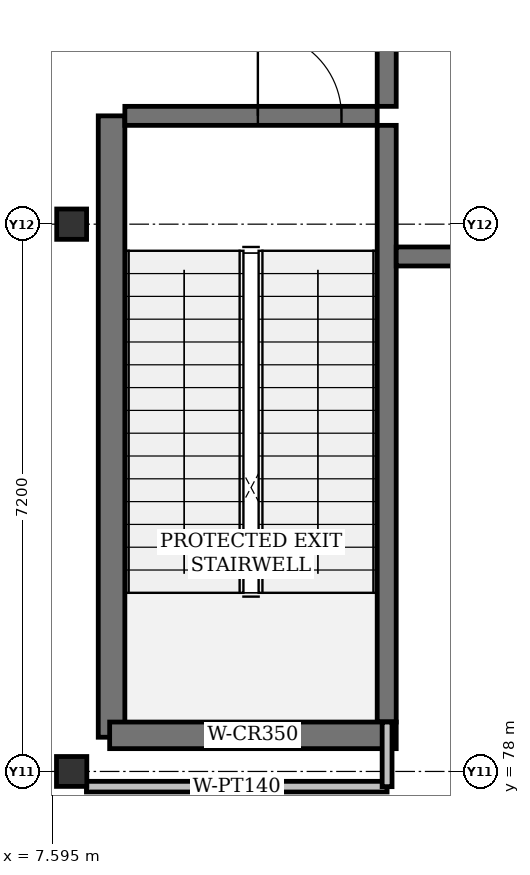
"""IFC4 building model, lengths in metres.
Left out: names, types, materials, properties, quantities, classifications, styles, units other than length and angle.
Written with IfcOpenShell. Run it as: python <this file> out.ifc"""

import sys

from ifc_helpers import new_model, si_unit, direction, frame, frame_2d, origin, origin_2d, place, context, subcontext, project, spatial, rectangle, i_section, extrude, element, fill, save


model = new_model("IFC4")
c1 = context("Model", 3, precision=1e-05, world=origin(), true_north=direction((0.0, 1.0)))
c2 = subcontext(c1, "Body", "Model", "MODEL_VIEW")
j1 = project(units=[si_unit("LENGTHUNIT", "METRE"), si_unit("PLANEANGLEUNIT", "RADIAN")], contexts=[c1])
p1 = place(None, origin())
s1 = spatial("IfcSite", under=j1, at=p1, CompositionType="ELEMENT")
p2 = place(p1, origin())
s2 = spatial("IfcBuilding", under=s1, at=p2, CompositionType="ELEMENT")
p3 = place(p2, origin())
s3 = spatial("IfcBuildingStorey", under=s2, at=p3, CompositionType="ELEMENT", Elevation=0.0)
for number, where, z_axis, x_axis in (
    (1, (7.85, 78.0, 0.0), (0.0, 0.0, 1.0), (1.0, 0.0, 0.0)),
    (2, (7.85, 85.2, 0.0), (0.0, 0.0, 1.0), (0.0, 1.0, 0.0)),
):
    element("IfcColumn", number, at=place(p3, frame(where, z_axis=z_axis, x_axis=x_axis)), inside=s3, PredefinedType="COLUMN", context=c2, shape_type="SweptSolid", body=[
        extrude(i_section(OverallWidth=0.399, OverallDepth=0.393, WebThickness=0.023, FlangeThickness=0.036, FilletRadius=0.015, at=origin_2d()), origin(), (0.0, 0.0, 1.0), 5.4),
    ])
p4 = place(p3, frame((8.375, 78.45, 0.0), z_axis=(0.0, 0.0, 1.0), x_axis=(0.0, 1.0, 0.0)))
e3 = element("IfcWall", 3, at=p4, inside=s3, PredefinedType="SHEAR", context=c2, shape_type="SweptSolid", body=[
    extrude(rectangle(XDim=8.175, YDim=0.35, at=frame_2d((4.087, 0.0))), origin(), (0.0, 0.0, 1.0), 5.4),
])
p5 = place(p3, frame((11.995, 78.65, 0.0), z_axis=(0.0, 0.0, 1.0), x_axis=(0.0, 1.0, 0.0)))
e4 = element("IfcWall", 4, at=p5, inside=s3, PredefinedType="SHEAR", context=c2, shape_type="SweptSolid", body=[
    extrude(rectangle(XDim=7.85, YDim=0.25, at=frame_2d((3.925, 0.0))), origin(), (0.0, 0.0, 1.0), 5.4),
])
p6 = place(p3, frame((11.995, 86.75, 0.0), z_axis=(0.0, 0.0, 1.0), x_axis=(0.0, 1.0, 0.0)))
e5 = element("IfcWall", 5, at=p6, inside=s3, PredefinedType="SHEAR", context=c2, shape_type="SweptSolid", body=[
    extrude(rectangle(XDim=3.9, YDim=0.25, at=frame_2d((1.95, 0.0))), origin(), (0.0, 0.0, 1.0), 5.4),
])
p7 = place(p6, frame((1.3, 0.0, 0.0)))
e6 = element("IfcOpeningElement", 6, at=p7, cuts=e5, PredefinedType="OPENING", context=c2, shape_type="SweptSolid", body=[
    extrude(rectangle(XDim=1.25, YDim=2.2, at=frame_2d((0.625, 1.1))), frame((0.0, 0.125, 0.0), z_axis=(0.0, -1.0, 0.0), x_axis=(1.0, 0.0, 0.0)), (0.0, 0.0, 1.0), 0.25),
])
p8 = place(p3, frame((8.35, 78.475, 0.0), z_axis=(0.0, 0.0, 1.0), x_axis=(1.0, 0.0, 0.0)))
e7 = element("IfcWall", 7, at=p8, inside=s3, PredefinedType="SHEAR", context=c2, shape_type="SweptSolid", body=[
    extrude(rectangle(XDim=3.77, YDim=0.35, at=frame_2d((1.885, 0.0))), origin(), (0.0, 0.0, 1.0), 5.4),
])
p9 = place(p3, frame((8.55, 86.625, 0.0), z_axis=(0.0, 0.0, 1.0), x_axis=(1.0, 0.0, 0.0)))
e8 = element("IfcWall", 8, at=p9, inside=s3, PredefinedType="SHEAR", context=c2, shape_type="SweptSolid", body=[
    extrude(rectangle(XDim=3.32, YDim=0.25, at=frame_2d((1.66, 0.0))), origin(), (0.0, 0.0, 1.0), 5.4),
])
p10 = place(p9, frame((1.75, 0.0, 0.0)))
e9 = element("IfcOpeningElement", 9, at=p10, cuts=e8, PredefinedType="OPENING", context=c2, shape_type="SweptSolid", body=[
    extrude(rectangle(XDim=1.1, YDim=2.15, at=frame_2d((0.55, 1.075))), frame((0.0, 0.125, 0.0), z_axis=(0.0, -1.0, 0.0), x_axis=(1.0, 0.0, 0.0)), (0.0, 0.0, 1.0), 0.25),
])
p11 = place(p3, frame((12.12, 84.775, 0.0), z_axis=(0.0, 0.0, 1.0), x_axis=(1.0, 0.0, 0.0)))
e10 = element("IfcWall", 10, at=p11, inside=s3, PredefinedType="SHEAR", context=c2, shape_type="SweptSolid", body=[
    extrude(rectangle(XDim=4.03, YDim=0.25, at=frame_2d((2.015, 0.0))), origin(), (0.0, 0.0, 1.0), 5.4),
])
p12 = place(p11, frame((1.3, 0.0, 0.0)))
e11 = element("IfcOpeningElement", 11, at=p12, cuts=e10, PredefinedType="OPENING", context=c2, shape_type="SweptSolid", body=[
    extrude(rectangle(XDim=1.4, YDim=2.25, at=frame_2d((0.7, 1.125))), frame((0.0, 0.125, 0.0), z_axis=(0.0, -1.0, 0.0), x_axis=(1.0, 0.0, 0.0)), (0.0, 0.0, 1.0), 0.25),
])
p13 = place(p3, frame((8.044, 77.8, 0.0), z_axis=(0.0, 0.0, 1.0), x_axis=(1.0, 0.0, 0.0)))
e12 = element("IfcWall", 12, at=p13, inside=s3, PredefinedType="PARTITIONING", context=c2, shape_type="SweptSolid", body=[
    extrude(rectangle(XDim=3.956, YDim=0.14, at=frame_2d((1.978, 0.0))), origin(), (0.0, 0.0, 1.0), 4.651),
])
p14 = place(p3, frame((12.0, 77.8, 0.0), z_axis=(0.0, 0.0, 1.0), x_axis=(0.0, 1.0, 0.0)))
e13 = element("IfcWall", 13, at=p14, inside=s3, PredefinedType="PARTITIONING", context=c2, shape_type="SweptSolid", body=[
    extrude(rectangle(XDim=0.85, YDim=0.13, at=frame_2d((0.425, 0.0))), origin(), (0.0, 0.0, 1.0), 4.651),
])
p15 = place(p10, origin())
e14 = element("IfcDoor", 14, at=p15, inside=s3, OperationType="SINGLE_SWING_LEFT", PredefinedType="DOOR", context=c2, shape_type="SweptSolid", body=[
    extrude(rectangle(XDim=1.1, YDim=2.15, at=frame_2d((0.55, 1.075))), frame((0.0, 0.025, 0.0), z_axis=(0.0, -1.0, 0.0), x_axis=(1.0, 0.0, 0.0)), (0.0, 0.0, 1.0), 0.05),
])
fill(e9, e14)
save(model, sys.argv[1])
